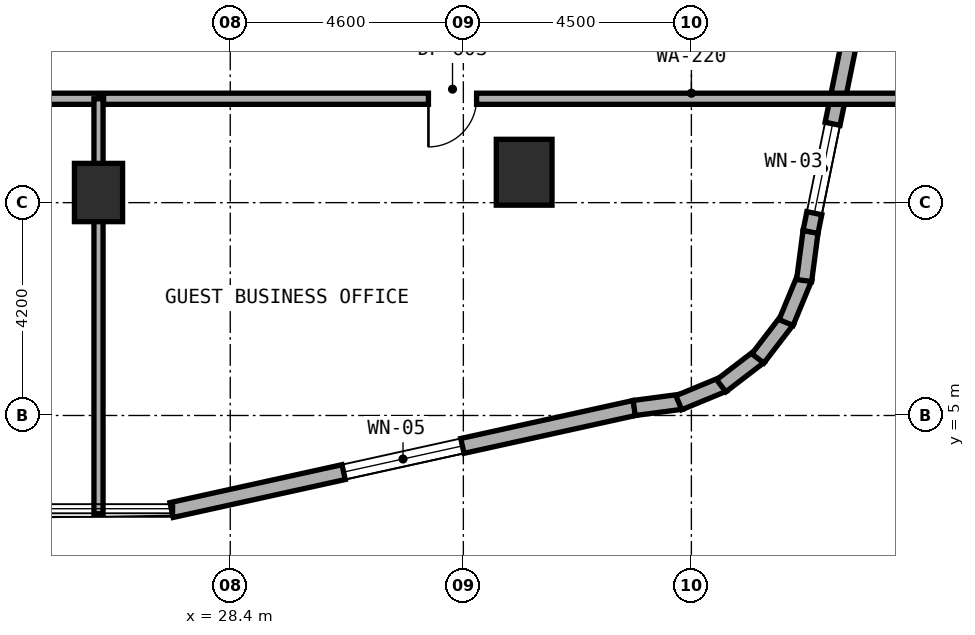
"""IFC4 building model, lengths in metres.
Left out: names, types, materials, properties, quantities, classifications, styles, units other than length and angle.
Written with IfcOpenShell. Run it as: python <this file> out.ifc"""

import sys

from ifc_helpers import new_model, si_unit, direction, frame, frame_2d, origin, origin_2d, place, context, subcontext, project, spatial, rectangle, extrude, element, fill, save


model = new_model("IFC4")
c1 = context("Model", 3, precision=1e-05, world=origin(), true_north=direction((0.0, 1.0)))
c2 = subcontext(c1, "Body", "Model", "MODEL_VIEW")
j1 = project(units=[si_unit("LENGTHUNIT", "METRE"), si_unit("PLANEANGLEUNIT", "RADIAN")], contexts=[c1])
p1 = place(None, origin())
s1 = spatial("IfcSite", under=j1, at=p1, CompositionType="ELEMENT")
p2 = place(p1, origin())
s2 = spatial("IfcBuilding", under=s1, at=p2, CompositionType="ELEMENT")
p3 = place(p2, frame((0.0, 0.0, 24.0)))
s3 = spatial("IfcBuildingStorey", under=s2, at=p3, CompositionType="ELEMENT", Elevation=24.0)
p4 = place(p3, frame((25.8, 9.4, 0.0), z_axis=(0.0, 0.0, 1.0), x_axis=(1.0, 0.0, 0.0)))
e1 = element("IfcColumn", 1, at=p4, inside=s3, PredefinedType="COLUMN", context=c2, shape_type="SweptSolid", body=[
    extrude(rectangle(XDim=0.95, YDim=1.15, at=origin_2d()), origin(), (0.0, 0.0, 1.0), 3.5),
])
p5 = place(p3, frame((34.2, 9.8, 0.0), z_axis=(0.0, 0.0, 1.0), x_axis=(1.0, 0.0, 0.0)))
e2 = element("IfcColumn", 2, at=p5, inside=s3, PredefinedType="COLUMN", context=c2, shape_type="SweptSolid", body=[
    extrude(rectangle(XDim=1.1, YDim=1.3, at=origin_2d()), origin(), (0.0, 0.0, 1.0), 3.5),
])
p6 = place(p3, frame((27.242, 3.134, 0.0), z_axis=(0.0, 0.0, 1.0), x_axis=(0.97654500432, 0.215313386808, 0.0)))
e3 = element("IfcWall", 3, at=p6, inside=s3, PredefinedType="STANDARD", context=c2, shape_type="SweptSolid", body=[
    extrude(rectangle(XDim=9.354, YDim=0.3, at=frame_2d((4.677, 0.0))), origin(), (0.0, 0.0, 1.0), 3.22),
])
p7 = place(p6, frame((3.477, 0.0, 0.8)))
e4 = element("IfcOpeningElement", 4, at=p7, cuts=e3, PredefinedType="OPENING", context=c2, shape_type="SweptSolid", body=[
    extrude(rectangle(XDim=2.4, YDim=1.6, at=frame_2d((1.2, 0.8))), frame((0.0, 0.16, 0.0), z_axis=(0.0, -1.0, 0.0), x_axis=(1.0, 0.0, 0.0)), (0.0, 0.0, 1.0), 0.32),
])
p8 = place(p3, frame((36.372, 5.148, 0.0), z_axis=(0.0, 0.0, 1.0), x_axis=(0.991359246108, 0.131174864804, 0.0)))
e5 = element("IfcWall", 5, at=p8, inside=s3, PredefinedType="STANDARD", context=c2, shape_type="SweptSolid", body=[
    extrude(rectangle(XDim=0.938, YDim=0.3, at=frame_2d((0.469, 0.0))), origin(), (0.0, 0.0, 1.0), 3.22),
])
p9 = place(p3, frame((37.252, 5.252, 0.0), z_axis=(0.0, 0.0, 1.0), x_axis=(0.924019948111, 0.382344263057, 0.0)))
e6 = element("IfcWall", 6, at=p9, inside=s3, PredefinedType="STANDARD", context=c2, shape_type="SweptSolid", body=[
    extrude(rectangle(XDim=0.955, YDim=0.3, at=frame_2d((0.477, 0.0))), origin(), (0.0, 0.0, 1.0), 3.22),
])
p10 = place(p3, frame((38.089, 5.586, 0.0), z_axis=(0.0, 0.0, 1.0), x_axis=(0.793573440799, 0.608474481025, 0.0)))
e7 = element("IfcWall", 7, at=p10, inside=s3, PredefinedType="STANDARD", context=c2, shape_type="SweptSolid", body=[
    extrude(rectangle(XDim=0.955, YDim=0.3, at=frame_2d((0.478, 0.0))), origin(), (0.0, 0.0, 1.0), 3.22),
])
p11 = place(p3, frame((38.812, 6.125, 0.0), z_axis=(0.0, 0.0, 1.0), x_axis=(0.608351047625, 0.793668068435, 0.0)))
e8 = element("IfcWall", 8, at=p11, inside=s3, PredefinedType="STANDARD", context=c2, shape_type="SweptSolid", body=[
    extrude(rectangle(XDim=0.955, YDim=0.3, at=frame_2d((0.478, 0.0))), origin(), (0.0, 0.0, 1.0), 3.22),
])
p12 = place(p3, frame((39.369, 6.834, 0.0), z_axis=(0.0, 0.0, 1.0), x_axis=(0.382344263057, 0.924019948111, 0.0)))
e9 = element("IfcWall", 9, at=p12, inside=s3, PredefinedType="STANDARD", context=c2, shape_type="SweptSolid", body=[
    extrude(rectangle(XDim=0.955, YDim=0.3, at=frame_2d((0.477, 0.0))), origin(), (0.0, 0.0, 1.0), 3.22),
])
p13 = place(p3, frame((39.725, 7.663, 0.0), z_axis=(0.0, 0.0, 1.0), x_axis=(0.130454512571, 0.991454295543, 0.0)))
e10 = element("IfcWall", 10, at=p13, inside=s3, PredefinedType="STANDARD", context=c2, shape_type="SweptSolid", body=[
    extrude(rectangle(XDim=0.973, YDim=0.3, at=frame_2d((0.487, 0.0))), origin(), (0.0, 0.0, 1.0), 3.22),
])
p14 = place(p3, frame((39.851, 8.622, 0.0), z_axis=(0.0, 0.0, 1.0), x_axis=(0.200002104792, 0.979795467472, 0.0)))
e11 = element("IfcWall", 11, at=p14, inside=s3, PredefinedType="STANDARD", context=c2, shape_type="SweptSolid", body=[
    extrude(rectangle(XDim=10.0, YDim=0.3, at=frame_2d((5.0, 0.0))), origin(), (0.0, 0.0, 1.0), 3.22),
])
p15 = place(p14, frame((0.378, 0.0, 0.85)))
e12 = element("IfcOpeningElement", 12, at=p15, cuts=e11, PredefinedType="OPENING", context=c2, shape_type="SweptSolid", body=[
    extrude(rectangle(XDim=1.8, YDim=1.5, at=frame_2d((0.9, 0.75))), frame((0.0, 0.16, 0.0), z_axis=(0.0, -1.0, 0.0), x_axis=(1.0, 0.0, 0.0)), (0.0, 0.0, 1.0), 0.32),
])
p16 = place(p14, frame((5.204, 0.0, 0.8)))
e13 = element("IfcOpeningElement", 13, at=p16, cuts=e11, PredefinedType="OPENING", context=c2, shape_type="SweptSolid", body=[
    extrude(rectangle(XDim=2.4, YDim=1.6, at=frame_2d((1.2, 0.8))), frame((0.0, 0.16, 0.0), z_axis=(0.0, -1.0, 0.0), x_axis=(1.0, 0.0, 0.0)), (0.0, 0.0, 1.0), 0.32),
])
p17 = place(p3, frame((18.4, 11.25, 0.0), z_axis=(0.0, 0.0, 1.0), x_axis=(1.0, 0.0, 0.0)))
e14 = element("IfcWall", 14, at=p17, inside=s3, PredefinedType="SOLIDWALL", context=c2, shape_type="SweptSolid", body=[
    extrude(rectangle(XDim=7.4, YDim=0.22, at=frame_2d((3.7, 0.0))), origin(), (0.0, 0.0, 1.0), 2.295),
])
p18 = place(p17, frame((3.225, 0.0, 0.0)))
e15 = element("IfcOpeningElement", 15, at=p18, cuts=e14, PredefinedType="OPENING", context=c2, shape_type="SweptSolid", body=[
    extrude(rectangle(XDim=0.95, YDim=2.1, at=frame_2d((0.475, 1.05))), frame((0.0, 0.12, 0.0), z_axis=(0.0, -1.0, 0.0), x_axis=(1.0, 0.0, 0.0)), (0.0, 0.0, 1.0), 0.24),
])
p19 = place(p3, frame((25.8, 3.06, 0.0), z_axis=(0.0, 0.0, 1.0), x_axis=(0.0, 1.0, 0.0)))
e16 = element("IfcWall", 16, at=p19, inside=s3, PredefinedType="SOLIDWALL", context=c2, shape_type="SweptSolid", body=[
    extrude(rectangle(XDim=8.19, YDim=0.18, at=frame_2d((4.095, 0.0))), origin(), (0.0, 0.0, 1.0), 2.295),
])
p20 = place(p3, frame((25.9, 11.25, 0.0), z_axis=(0.0, 0.0, 1.0), x_axis=(1.0, 0.0, 0.0)))
e17 = element("IfcWall", 17, at=p20, inside=s3, PredefinedType="SOLIDWALL", context=c2, shape_type="SweptSolid", body=[
    extrude(rectangle(XDim=15.84, YDim=0.22, at=frame_2d((7.92, 0.0))), origin(), (0.0, 0.0, 1.0), 2.295),
])
p21 = place(p20, frame((6.411, 0.0, 0.0)))
e18 = element("IfcOpeningElement", 18, at=p21, cuts=e17, PredefinedType="OPENING", context=c2, shape_type="SweptSolid", body=[
    extrude(rectangle(XDim=0.95, YDim=2.1, at=frame_2d((0.475, 1.05))), frame((0.0, 0.12, 0.0), z_axis=(0.0, -1.0, 0.0), x_axis=(1.0, 0.0, 0.0)), (0.0, 0.0, 1.0), 0.24),
])
p22 = place(p7, origin())
e19 = element("IfcWindow", 19, at=p22, inside=s3, PartitioningType="SINGLE_PANEL", PredefinedType="WINDOW", context=c2, shape_type="SweptSolid", body=[
    extrude(rectangle(XDim=2.4, YDim=1.6, at=frame_2d((1.2, 0.8))), frame((0.0, 0.03, 0.0), z_axis=(0.0, -1.0, 0.0), x_axis=(1.0, 0.0, 0.0)), (0.0, 0.0, 1.0), 0.06),
])
fill(e4, e19)
p23 = place(p15, origin())
e20 = element("IfcWindow", 20, at=p23, inside=s3, PartitioningType="SINGLE_PANEL", PredefinedType="WINDOW", context=c2, shape_type="SweptSolid", body=[
    extrude(rectangle(XDim=1.8, YDim=1.5, at=frame_2d((0.9, 0.75))), frame((0.0, 0.03, 0.0), z_axis=(0.0, -1.0, 0.0), x_axis=(1.0, 0.0, 0.0)), (0.0, 0.0, 1.0), 0.06),
])
fill(e12, e20)
p24 = place(p21, frame((0.95, 0.0, 0.0), z_axis=(0.0, 0.0, 1.0), x_axis=(-1.0, 0.0, 0.0)))
e21 = element("IfcDoor", 21, at=p24, inside=s3, OperationType="SINGLE_SWING_RIGHT", PredefinedType="DOOR", context=c2, shape_type="SweptSolid", body=[
    extrude(rectangle(XDim=0.95, YDim=2.1, at=frame_2d((0.475, 1.05))), frame((0.0, 0.025, 0.0), z_axis=(0.0, -1.0, 0.0), x_axis=(1.0, 0.0, 0.0)), (0.0, 0.0, 1.0), 0.05),
])
fill(e18, e21)
save(model, sys.argv[1])
